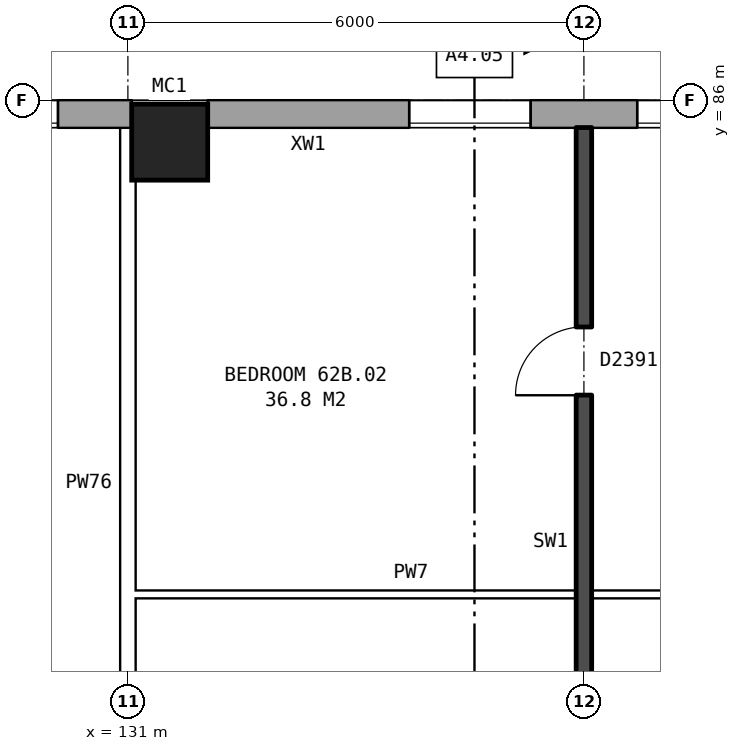
"""IFC4 building model, lengths in metres.
Left out: names, types, materials, properties, quantities, classifications, styles, units other than length and angle.
Written with IfcOpenShell. Run it as: python <this file> out.ifc"""

import sys

from ifc_helpers import new_model, si_unit, direction, frame, frame_2d, origin, origin_2d, place, context, subcontext, project, spatial, rectangle, hollow_rectangle, extrude, element, fill, save


model = new_model("IFC4")
c1 = context("Model", 3, precision=1e-05, world=origin(), true_north=direction((0.0, 1.0)))
c2 = subcontext(c1, "Body", "Model", "MODEL_VIEW")
j1 = project(units=[si_unit("LENGTHUNIT", "METRE"), si_unit("PLANEANGLEUNIT", "RADIAN")], contexts=[c1])
p1 = place(None, origin())
s1 = spatial("IfcSite", under=j1, at=p1, CompositionType="ELEMENT")
p2 = place(p1, origin())
s2 = spatial("IfcBuilding", under=s1, at=p2, CompositionType="ELEMENT")
p3 = place(p2, frame((0.0, 0.0, 221.4)))
s3 = spatial("IfcBuildingStorey", under=s2, at=p3, CompositionType="ELEMENT", Elevation=221.4)
p4 = place(p3, frame((131.55, 85.45, 0.0), z_axis=(0.0, 0.0, 1.0), x_axis=(1.0, 0.0, 0.0)))
e1 = element("IfcColumn", 1, at=p4, inside=s3, PredefinedType="COLUMN", context=c2, shape_type="SweptSolid", body=[
    extrude(hollow_rectangle(XDim=1.0, YDim=1.0, WallThickness=0.055, at=origin_2d()), origin(), (0.0, 0.0, 1.0), 3.1),
])
p5 = place(p3, frame((165.925, 85.82, 0.0), z_axis=(0.0, 0.0, 1.0), x_axis=(-1.0, 0.0, 0.0)))
e2 = element("IfcWall", 2, at=p5, inside=s3, PredefinedType="STANDARD", context=c2, shape_type="SweptSolid", body=[
    extrude(rectangle(XDim=33.875, YDim=0.36, at=frame_2d((16.938, 0.0))), origin(), (0.0, 0.0, 1.0), 2.85),
])
p6 = place(p5, frame((2.625, 0.0, 0.8)))
e3 = element("IfcOpeningElement", 3, at=p6, cuts=e2, PredefinedType="OPENING", context=c2, shape_type="SweptSolid", body=[
    extrude(rectangle(XDim=1.6, YDim=1.8, at=frame_2d((0.8, 0.9))), frame((0.0, 0.19, 0.0), z_axis=(0.0, -1.0, 0.0), x_axis=(1.0, 0.0, 0.0)), (0.0, 0.0, 1.0), 0.38),
])
p7 = place(p5, frame((5.625, 0.0, 0.8)))
e4 = element("IfcOpeningElement", 4, at=p7, cuts=e2, PredefinedType="OPENING", context=c2, shape_type="SweptSolid", body=[
    extrude(rectangle(XDim=1.6, YDim=1.8, at=frame_2d((0.8, 0.9))), frame((0.0, 0.19, 0.0), z_axis=(0.0, -1.0, 0.0), x_axis=(1.0, 0.0, 0.0)), (0.0, 0.0, 1.0), 0.38),
])
p8 = place(p5, frame((9.625, 0.0, 0.8)))
e5 = element("IfcOpeningElement", 5, at=p8, cuts=e2, PredefinedType="OPENING", context=c2, shape_type="SweptSolid", body=[
    extrude(rectangle(XDim=1.0, YDim=1.8, at=frame_2d((0.5, 0.9))), frame((0.0, 0.19, 0.0), z_axis=(0.0, -1.0, 0.0), x_axis=(1.0, 0.0, 0.0)), (0.0, 0.0, 1.0), 0.38),
])
p9 = place(p5, frame((11.625, 0.0, 0.8)))
e6 = element("IfcOpeningElement", 6, at=p9, cuts=e2, PredefinedType="OPENING", context=c2, shape_type="SweptSolid", body=[
    extrude(rectangle(XDim=1.6, YDim=1.8, at=frame_2d((0.8, 0.9))), frame((0.0, 0.19, 0.0), z_axis=(0.0, -1.0, 0.0), x_axis=(1.0, 0.0, 0.0)), (0.0, 0.0, 1.0), 0.38),
])
p10 = place(p5, frame((14.625, 0.0, 0.8)))
e7 = element("IfcOpeningElement", 7, at=p10, cuts=e2, PredefinedType="OPENING", context=c2, shape_type="SweptSolid", body=[
    extrude(rectangle(XDim=1.6, YDim=1.8, at=frame_2d((0.8, 0.9))), frame((0.0, 0.19, 0.0), z_axis=(0.0, -1.0, 0.0), x_axis=(1.0, 0.0, 0.0)), (0.0, 0.0, 1.0), 0.38),
])
p11 = place(p5, frame((17.625, 0.0, 0.8)))
e8 = element("IfcOpeningElement", 8, at=p11, cuts=e2, PredefinedType="OPENING", context=c2, shape_type="SweptSolid", body=[
    extrude(rectangle(XDim=1.6, YDim=1.8, at=frame_2d((0.8, 0.9))), frame((0.0, 0.19, 0.0), z_axis=(0.0, -1.0, 0.0), x_axis=(1.0, 0.0, 0.0)), (0.0, 0.0, 1.0), 0.38),
])
p12 = place(p5, frame((20.625, 0.0, 0.8)))
e9 = element("IfcOpeningElement", 9, at=p12, cuts=e2, PredefinedType="OPENING", context=c2, shape_type="SweptSolid", body=[
    extrude(rectangle(XDim=1.6, YDim=1.8, at=frame_2d((0.8, 0.9))), frame((0.0, 0.19, 0.0), z_axis=(0.0, -1.0, 0.0), x_axis=(1.0, 0.0, 0.0)), (0.0, 0.0, 1.0), 0.38),
])
p13 = place(p5, frame((23.825, 0.0, 1.7)))
e10 = element("IfcOpeningElement", 10, at=p13, cuts=e2, PredefinedType="OPENING", context=c2, shape_type="SweptSolid", body=[
    extrude(rectangle(XDim=0.6, YDim=0.9, at=frame_2d((0.3, 0.45))), frame((0.0, 0.19, 0.0), z_axis=(0.0, -1.0, 0.0), x_axis=(1.0, 0.0, 0.0)), (0.0, 0.0, 1.0), 0.38),
])
p14 = place(p5, frame((26.625, 0.0, 0.8)))
e11 = element("IfcOpeningElement", 11, at=p14, cuts=e2, PredefinedType="OPENING", context=c2, shape_type="SweptSolid", body=[
    extrude(rectangle(XDim=1.6, YDim=1.8, at=frame_2d((0.8, 0.9))), frame((0.0, 0.19, 0.0), z_axis=(0.0, -1.0, 0.0), x_axis=(1.0, 0.0, 0.0)), (0.0, 0.0, 1.0), 0.38),
])
p15 = place(p5, frame((29.625, 0.0, 0.8)))
e12 = element("IfcOpeningElement", 12, at=p15, cuts=e2, PredefinedType="OPENING", context=c2, shape_type="SweptSolid", body=[
    extrude(rectangle(XDim=1.6, YDim=1.8, at=frame_2d((0.8, 0.9))), frame((0.0, 0.19, 0.0), z_axis=(0.0, -1.0, 0.0), x_axis=(1.0, 0.0, 0.0)), (0.0, 0.0, 1.0), 0.38),
])
p16 = place(p5, frame((24.725, 0.0, 0.8)))
e13 = element("IfcOpeningElement", 13, at=p16, cuts=e2, PredefinedType="OPENING", context=c2, shape_type="SweptSolid", body=[
    extrude(rectangle(XDim=1.6, YDim=1.8, at=frame_2d((0.8, 0.9))), frame((0.0, 0.19, 0.0), z_axis=(0.0, -1.0, 0.0), x_axis=(1.0, 0.0, 0.0)), (0.0, 0.0, 1.0), 0.38),
])
p17 = place(p3, frame((131.05, 85.82, 0.0), z_axis=(0.0, 0.0, 1.0), x_axis=(-1.0, 0.0, 0.0)))
e14 = element("IfcWall", 14, at=p17, inside=s3, PredefinedType="STANDARD", context=c2, shape_type="SweptSolid", body=[
    extrude(rectangle(XDim=55.1, YDim=0.36, at=frame_2d((27.55, 0.0))), origin(), (0.0, 0.0, 1.0), 2.85),
])
p18 = place(p17, frame((0.969, 0.0, 0.8)))
e15 = element("IfcOpeningElement", 15, at=p18, cuts=e14, PredefinedType="OPENING", context=c2, shape_type="SweptSolid", body=[
    extrude(rectangle(XDim=1.6, YDim=1.8, at=frame_2d((0.8, 0.9))), frame((0.0, 0.19, 0.0), z_axis=(0.0, -1.0, 0.0), x_axis=(1.0, 0.0, 0.0)), (0.0, 0.0, 1.0), 0.38),
])
p19 = place(p17, frame((4.406, 0.0, 0.8)))
e16 = element("IfcOpeningElement", 16, at=p19, cuts=e14, PredefinedType="OPENING", context=c2, shape_type="SweptSolid", body=[
    extrude(rectangle(XDim=1.6, YDim=1.8, at=frame_2d((0.8, 0.9))), frame((0.0, 0.19, 0.0), z_axis=(0.0, -1.0, 0.0), x_axis=(1.0, 0.0, 0.0)), (0.0, 0.0, 1.0), 0.38),
])
p20 = place(p17, frame((7.844, 0.0, 0.8)))
e17 = element("IfcOpeningElement", 17, at=p20, cuts=e14, PredefinedType="OPENING", context=c2, shape_type="SweptSolid", body=[
    extrude(rectangle(XDim=1.6, YDim=1.8, at=frame_2d((0.8, 0.9))), frame((0.0, 0.19, 0.0), z_axis=(0.0, -1.0, 0.0), x_axis=(1.0, 0.0, 0.0)), (0.0, 0.0, 1.0), 0.38),
])
p21 = place(p17, frame((11.281, 0.0, 0.8)))
e18 = element("IfcOpeningElement", 18, at=p21, cuts=e14, PredefinedType="OPENING", context=c2, shape_type="SweptSolid", body=[
    extrude(rectangle(XDim=1.6, YDim=1.8, at=frame_2d((0.8, 0.9))), frame((0.0, 0.19, 0.0), z_axis=(0.0, -1.0, 0.0), x_axis=(1.0, 0.0, 0.0)), (0.0, 0.0, 1.0), 0.38),
])
p22 = place(p17, frame((14.719, 0.0, 0.8)))
e19 = element("IfcOpeningElement", 19, at=p22, cuts=e14, PredefinedType="OPENING", context=c2, shape_type="SweptSolid", body=[
    extrude(rectangle(XDim=1.6, YDim=1.8, at=frame_2d((0.8, 0.9))), frame((0.0, 0.19, 0.0), z_axis=(0.0, -1.0, 0.0), x_axis=(1.0, 0.0, 0.0)), (0.0, 0.0, 1.0), 0.38),
])
p23 = place(p17, frame((18.156, 0.0, 0.8)))
e20 = element("IfcOpeningElement", 20, at=p23, cuts=e14, PredefinedType="OPENING", context=c2, shape_type="SweptSolid", body=[
    extrude(rectangle(XDim=1.6, YDim=1.8, at=frame_2d((0.8, 0.9))), frame((0.0, 0.19, 0.0), z_axis=(0.0, -1.0, 0.0), x_axis=(1.0, 0.0, 0.0)), (0.0, 0.0, 1.0), 0.38),
])
p24 = place(p17, frame((21.594, 0.0, 0.8)))
e21 = element("IfcOpeningElement", 21, at=p24, cuts=e14, PredefinedType="OPENING", context=c2, shape_type="SweptSolid", body=[
    extrude(rectangle(XDim=1.6, YDim=1.8, at=frame_2d((0.8, 0.9))), frame((0.0, 0.19, 0.0), z_axis=(0.0, -1.0, 0.0), x_axis=(1.0, 0.0, 0.0)), (0.0, 0.0, 1.0), 0.38),
])
p25 = place(p17, frame((25.031, 0.0, 0.8)))
e22 = element("IfcOpeningElement", 22, at=p25, cuts=e14, PredefinedType="OPENING", context=c2, shape_type="SweptSolid", body=[
    extrude(rectangle(XDim=1.6, YDim=1.8, at=frame_2d((0.8, 0.9))), frame((0.0, 0.19, 0.0), z_axis=(0.0, -1.0, 0.0), x_axis=(1.0, 0.0, 0.0)), (0.0, 0.0, 1.0), 0.38),
])
p26 = place(p17, frame((28.469, 0.0, 0.8)))
e23 = element("IfcOpeningElement", 23, at=p26, cuts=e14, PredefinedType="OPENING", context=c2, shape_type="SweptSolid", body=[
    extrude(rectangle(XDim=1.6, YDim=1.8, at=frame_2d((0.8, 0.9))), frame((0.0, 0.19, 0.0), z_axis=(0.0, -1.0, 0.0), x_axis=(1.0, 0.0, 0.0)), (0.0, 0.0, 1.0), 0.38),
])
p27 = place(p17, frame((31.906, 0.0, 0.8)))
e24 = element("IfcOpeningElement", 24, at=p27, cuts=e14, PredefinedType="OPENING", context=c2, shape_type="SweptSolid", body=[
    extrude(rectangle(XDim=1.6, YDim=1.8, at=frame_2d((0.8, 0.9))), frame((0.0, 0.19, 0.0), z_axis=(0.0, -1.0, 0.0), x_axis=(1.0, 0.0, 0.0)), (0.0, 0.0, 1.0), 0.38),
])
p28 = place(p17, frame((35.344, 0.0, 0.8)))
e25 = element("IfcOpeningElement", 25, at=p28, cuts=e14, PredefinedType="OPENING", context=c2, shape_type="SweptSolid", body=[
    extrude(rectangle(XDim=1.6, YDim=1.8, at=frame_2d((0.8, 0.9))), frame((0.0, 0.19, 0.0), z_axis=(0.0, -1.0, 0.0), x_axis=(1.0, 0.0, 0.0)), (0.0, 0.0, 1.0), 0.38),
])
p29 = place(p17, frame((38.781, 0.0, 0.8)))
e26 = element("IfcOpeningElement", 26, at=p29, cuts=e14, PredefinedType="OPENING", context=c2, shape_type="SweptSolid", body=[
    extrude(rectangle(XDim=1.6, YDim=1.8, at=frame_2d((0.8, 0.9))), frame((0.0, 0.19, 0.0), z_axis=(0.0, -1.0, 0.0), x_axis=(1.0, 0.0, 0.0)), (0.0, 0.0, 1.0), 0.38),
])
p30 = place(p17, frame((42.219, 0.0, 0.8)))
e27 = element("IfcOpeningElement", 27, at=p30, cuts=e14, PredefinedType="OPENING", context=c2, shape_type="SweptSolid", body=[
    extrude(rectangle(XDim=1.6, YDim=1.8, at=frame_2d((0.8, 0.9))), frame((0.0, 0.19, 0.0), z_axis=(0.0, -1.0, 0.0), x_axis=(1.0, 0.0, 0.0)), (0.0, 0.0, 1.0), 0.38),
])
p31 = place(p17, frame((45.656, 0.0, 0.8)))
e28 = element("IfcOpeningElement", 28, at=p31, cuts=e14, PredefinedType="OPENING", context=c2, shape_type="SweptSolid", body=[
    extrude(rectangle(XDim=1.6, YDim=1.8, at=frame_2d((0.8, 0.9))), frame((0.0, 0.19, 0.0), z_axis=(0.0, -1.0, 0.0), x_axis=(1.0, 0.0, 0.0)), (0.0, 0.0, 1.0), 0.38),
])
p32 = place(p17, frame((49.094, 0.0, 0.8)))
e29 = element("IfcOpeningElement", 29, at=p32, cuts=e14, PredefinedType="OPENING", context=c2, shape_type="SweptSolid", body=[
    extrude(rectangle(XDim=1.6, YDim=1.8, at=frame_2d((0.8, 0.9))), frame((0.0, 0.19, 0.0), z_axis=(0.0, -1.0, 0.0), x_axis=(1.0, 0.0, 0.0)), (0.0, 0.0, 1.0), 0.38),
])
p33 = place(p17, frame((52.531, 0.0, 0.8)))
e30 = element("IfcOpeningElement", 30, at=p33, cuts=e14, PredefinedType="OPENING", context=c2, shape_type="SweptSolid", body=[
    extrude(rectangle(XDim=1.6, YDim=1.8, at=frame_2d((0.8, 0.9))), frame((0.0, 0.19, 0.0), z_axis=(0.0, -1.0, 0.0), x_axis=(1.0, 0.0, 0.0)), (0.0, 0.0, 1.0), 0.38),
])
p34 = place(p3, frame((131.1, 79.5, 0.0), z_axis=(0.0, 0.0, 1.0), x_axis=(1.0, 0.0, 0.0)))
e31 = element("IfcWall", 31, at=p34, inside=s3, PredefinedType="PARTITIONING", context=c2, shape_type="SweptSolid", body=[
    extrude(rectangle(XDim=11.8, YDim=0.1, at=frame_2d((5.9, 0.0))), origin(), (0.0, 0.0, 1.0), 2.85),
])
p35 = place(p34, frame((7.25, 0.0, 0.0)))
e32 = element("IfcOpeningElement", 32, at=p35, cuts=e31, PredefinedType="OPENING", context=c2, shape_type="SweptSolid", body=[
    extrude(rectangle(XDim=0.9, YDim=2.1, at=frame_2d((0.45, 1.05))), frame((0.0, 0.06, 0.0), z_axis=(0.0, -1.0, 0.0), x_axis=(1.0, 0.0, 0.0)), (0.0, 0.0, 1.0), 0.12),
])
p36 = place(p34, frame((10.2, 0.0, 0.0)))
e33 = element("IfcOpeningElement", 33, at=p36, cuts=e31, PredefinedType="OPENING", context=c2, shape_type="SweptSolid", body=[
    extrude(rectangle(XDim=0.9, YDim=2.1, at=frame_2d((0.45, 1.05))), frame((0.0, 0.06, 0.0), z_axis=(0.0, -1.0, 0.0), x_axis=(1.0, 0.0, 0.0)), (0.0, 0.0, 1.0), 0.12),
])
p37 = place(p3, frame((131.0, 76.3, 0.0), z_axis=(0.0, 0.0, 1.0), x_axis=(0.0, 1.0, 0.0)))
e34 = element("IfcWall", 34, at=p37, inside=s3, PredefinedType="PARTITIONING", context=c2, shape_type="SweptSolid", body=[
    extrude(rectangle(XDim=9.34, YDim=0.2, at=frame_2d((4.67, 0.0))), origin(), (0.0, 0.0, 1.0), 2.85),
])
p38 = place(p3, frame((137.0, 76.2, 0.0), z_axis=(0.0, 0.0, 1.0), x_axis=(0.0, 1.0, 0.0)))
e35 = element("IfcWall", 35, at=p38, inside=s3, PredefinedType="SOLIDWALL", context=c2, shape_type="SweptSolid", body=[
    extrude(rectangle(XDim=9.44, YDim=0.2, at=frame_2d((4.72, 0.0))), origin(), (0.0, 0.0, 1.0), 2.85),
])
p39 = place(p38, frame((5.92, 0.0, 0.0)))
e36 = element("IfcOpeningElement", 36, at=p39, cuts=e35, PredefinedType="OPENING", context=c2, shape_type="SweptSolid", body=[
    extrude(rectangle(XDim=0.9, YDim=2.1, at=frame_2d((0.45, 1.05))), frame((0.0, 0.11, 0.0), z_axis=(0.0, -1.0, 0.0), x_axis=(1.0, 0.0, 0.0)), (0.0, 0.0, 1.0), 0.22),
])
p40 = place(p38, frame((1.25, 0.0, 0.0)))
e37 = element("IfcOpeningElement", 37, at=p40, cuts=e35, PredefinedType="OPENING", context=c2, shape_type="SweptSolid", body=[
    extrude(rectangle(XDim=0.8, YDim=2.1, at=frame_2d((0.4, 1.05))), frame((0.0, 0.11, 0.0), z_axis=(0.0, -1.0, 0.0), x_axis=(1.0, 0.0, 0.0)), (0.0, 0.0, 1.0), 0.22),
])
p41 = place(p14, origin())
e38 = element("IfcWindow", 38, at=p41, inside=s3, PartitioningType="SINGLE_PANEL", PredefinedType="WINDOW", context=c2, shape_type="SweptSolid", body=[
    extrude(rectangle(XDim=1.6, YDim=1.8, at=frame_2d((0.8, 0.9))), frame((0.0, 0.15, 0.0), z_axis=(0.0, -1.0, 0.0), x_axis=(1.0, 0.0, 0.0)), (0.0, 0.0, 1.0), 0.06),
])
fill(e11, e38)
p42 = place(p15, origin())
e39 = element("IfcWindow", 39, at=p42, inside=s3, PartitioningType="SINGLE_PANEL", PredefinedType="WINDOW", context=c2, shape_type="SweptSolid", body=[
    extrude(rectangle(XDim=1.6, YDim=1.8, at=frame_2d((0.8, 0.9))), frame((0.0, 0.15, 0.0), z_axis=(0.0, -1.0, 0.0), x_axis=(1.0, 0.0, 0.0)), (0.0, 0.0, 1.0), 0.06),
])
fill(e12, e39)
p43 = place(p18, origin())
e40 = element("IfcWindow", 40, at=p43, inside=s3, PartitioningType="SINGLE_PANEL", PredefinedType="WINDOW", context=c2, shape_type="SweptSolid", body=[
    extrude(rectangle(XDim=1.6, YDim=1.8, at=frame_2d((0.8, 0.9))), frame((0.0, 0.15, 0.0), z_axis=(0.0, -1.0, 0.0), x_axis=(1.0, 0.0, 0.0)), (0.0, 0.0, 1.0), 0.06),
])
fill(e15, e40)
p44 = place(p39, origin())
e41 = element("IfcDoor", 41, at=p44, inside=s3, OperationType="SINGLE_SWING_LEFT", PredefinedType="DOOR", context=c2, shape_type="SweptSolid", body=[
    extrude(rectangle(XDim=0.9, YDim=2.1, at=frame_2d((0.45, 1.05))), frame((0.0, 0.025, 0.0), z_axis=(0.0, -1.0, 0.0), x_axis=(1.0, 0.0, 0.0)), (0.0, 0.0, 1.0), 0.05),
])
fill(e36, e41)
save(model, sys.argv[1])
